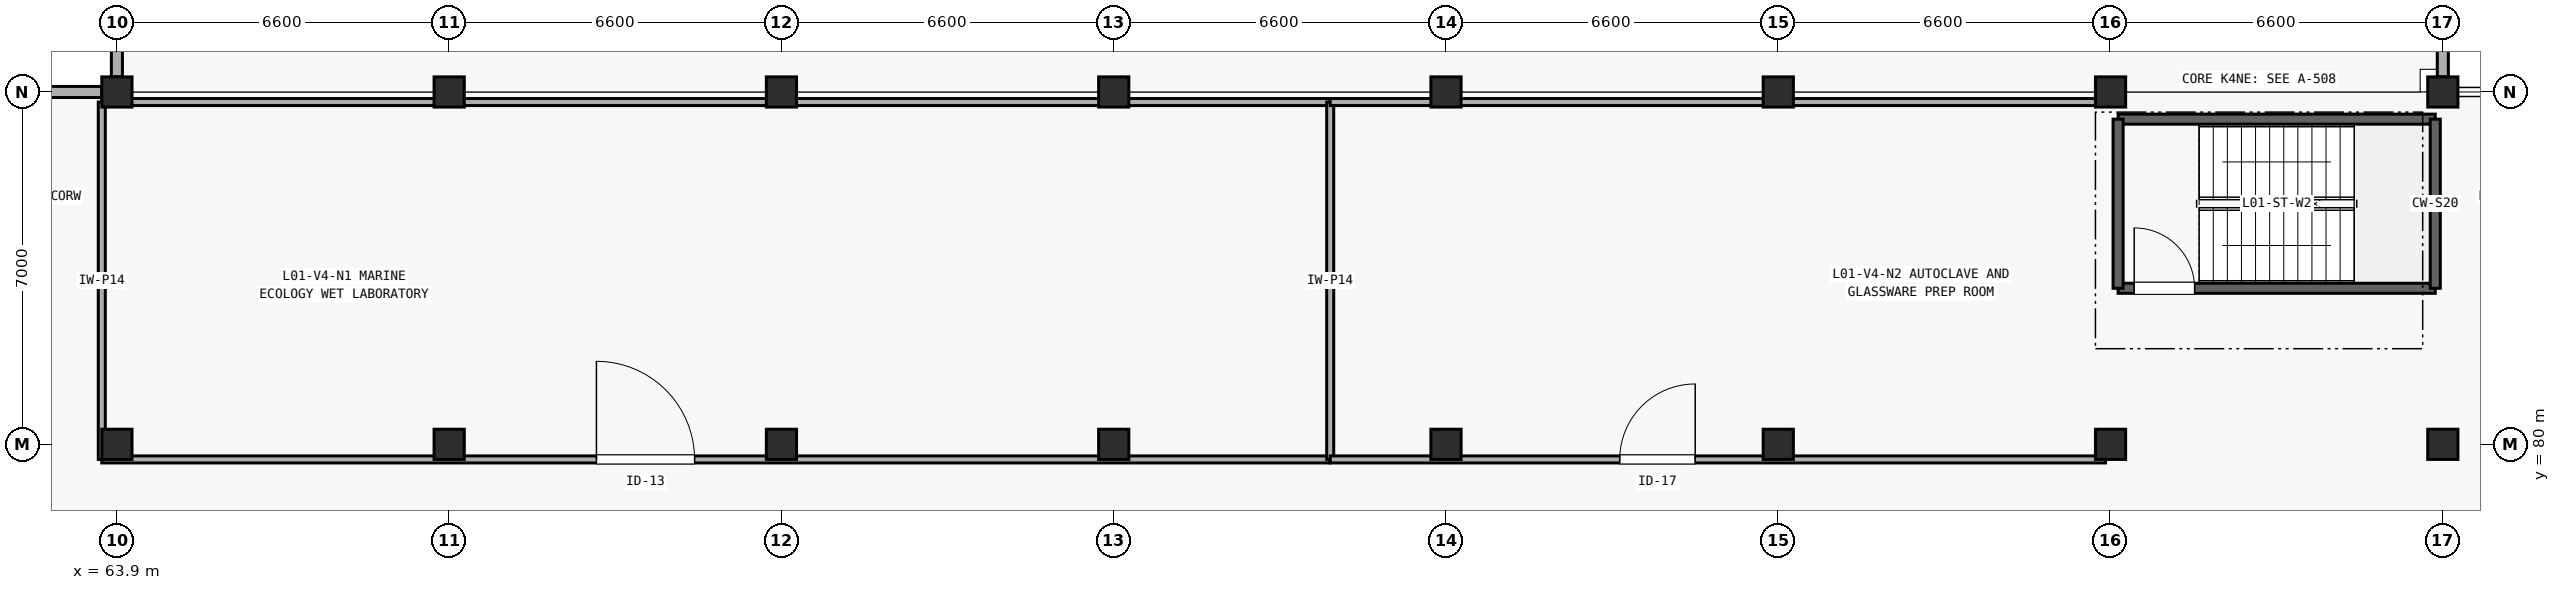
"""IFC4 building model, lengths in metres.
Left out: names, types, materials, properties, quantities, classifications, styles, units other than length and angle.
Written with IfcOpenShell. Run it as: python <this file> out.ifc"""

import sys

from ifc_helpers import new_model, si_unit, direction, frame, frame_2d, origin, origin_2d, place, context, subcontext, project, spatial, rectangle, extrude, element, fill, save


model = new_model("IFC4")
c1 = context("Model", 3, precision=1e-05, world=origin(), true_north=direction((0.0, 1.0)))
c2 = subcontext(c1, "Body", "Model", "MODEL_VIEW")
j1 = project(units=[si_unit("LENGTHUNIT", "METRE"), si_unit("PLANEANGLEUNIT", "RADIAN")], contexts=[c1])
p1 = place(None, origin())
s1 = spatial("IfcSite", under=j1, at=p1, CompositionType="ELEMENT")
p2 = place(p1, origin())
s2 = spatial("IfcBuilding", under=s1, at=p2, CompositionType="ELEMENT")
p3 = place(p2, frame((0.0, 0.0, 4.2)))
s3 = spatial("IfcBuildingStorey", under=s2, at=p3, CompositionType="ELEMENT", Elevation=4.2)
for number, where, z_axis, x_axis in (
    (1, (63.9, 80.0, 0.0), (0.0, 0.0, 1.0), (1.0, 0.0, 0.0)),
    (2, (63.9, 87.0, 0.0), (0.0, 0.0, 1.0), (1.0, 0.0, 0.0)),
    (3, (70.5, 80.0, 0.0), (0.0, 0.0, 1.0), (1.0, 0.0, 0.0)),
    (4, (70.5, 87.0, 0.0), (0.0, 0.0, 1.0), (1.0, 0.0, 0.0)),
    (5, (77.1, 80.0, 0.0), (0.0, 0.0, 1.0), (1.0, 0.0, 0.0)),
    (6, (77.1, 87.0, 0.0), (0.0, 0.0, 1.0), (1.0, 0.0, 0.0)),
    (7, (83.7, 80.0, 0.0), (0.0, 0.0, 1.0), (1.0, 0.0, 0.0)),
    (8, (83.7, 87.0, 0.0), (0.0, 0.0, 1.0), (1.0, 0.0, 0.0)),
    (9, (90.3, 80.0, 0.0), (0.0, 0.0, 1.0), (1.0, 0.0, 0.0)),
    (10, (90.3, 87.0, 0.0), (0.0, 0.0, 1.0), (1.0, 0.0, 0.0)),
    (11, (96.9, 80.0, 0.0), (0.0, 0.0, 1.0), (1.0, 0.0, 0.0)),
    (12, (96.9, 87.0, 0.0), (0.0, 0.0, 1.0), (1.0, 0.0, 0.0)),
    (13, (103.5, 80.0, 0.0), (0.0, 0.0, 1.0), (1.0, 0.0, 0.0)),
    (14, (103.5, 87.0, 0.0), (0.0, 0.0, 1.0), (1.0, 0.0, 0.0)),
    (15, (110.1, 80.0, 0.0), (0.0, 0.0, 1.0), (1.0, 0.0, 0.0)),
    (16, (110.1, 87.0, 0.0), (0.0, 0.0, 1.0), (1.0, 0.0, 0.0)),
):
    element("IfcColumn", number, at=place(p3, frame(where, z_axis=z_axis, x_axis=x_axis)), inside=s3, PredefinedType="COLUMN", context=c2, shape_type="SweptSolid", body=[
        extrude(rectangle(XDim=0.6, YDim=0.6, at=origin_2d()), origin(), (0.0, 0.0, 1.0), 4.2),
    ])
p4 = place(p3, frame((57.6, 87.0, 0.0), z_axis=(0.0, 0.0, 1.0), x_axis=(1.0, 0.0, 0.0)))
e17 = element("IfcWall", 17, at=p4, inside=s3, PredefinedType="SOLIDWALL", context=c2, shape_type="SweptSolid", body=[
    extrude(rectangle(XDim=6.0, YDim=0.22, at=frame_2d((3.0, 0.0))), origin(), (0.0, 0.0, 1.0), 3.345),
])
p5 = place(p4, frame((2.45, 0.0, 0.85)))
e18 = element("IfcOpeningElement", 18, at=p5, cuts=e17, PredefinedType="OPENING", context=c2, shape_type="SweptSolid", body=[
    extrude(rectangle(XDim=1.1, YDim=1.45, at=frame_2d((0.55, 0.725))), frame((0.0, 0.12, 0.0), z_axis=(0.0, -1.0, 0.0), x_axis=(1.0, 0.0, 0.0)), (0.0, 0.0, 1.0), 0.24),
])
p6 = place(p3, frame((63.9, 87.3, 0.0), z_axis=(0.0, 0.0, 1.0), x_axis=(0.0, 1.0, 0.0)))
e19 = element("IfcWall", 19, at=p6, inside=s3, PredefinedType="SOLIDWALL", context=c2, shape_type="SweptSolid", body=[
    extrude(rectangle(XDim=6.4, YDim=0.22, at=frame_2d((3.2, 0.0))), origin(), (0.0, 0.0, 1.0), 3.565),
])
p7 = place(p6, frame((2.175, 0.0, 0.85)))
e20 = element("IfcOpeningElement", 20, at=p7, cuts=e19, PredefinedType="OPENING", context=c2, shape_type="SweptSolid", body=[
    extrude(rectangle(XDim=2.05, YDim=1.55, at=frame_2d((1.025, 0.775))), frame((0.0, 0.12, 0.0), z_axis=(0.0, -1.0, 0.0), x_axis=(1.0, 0.0, 0.0)), (0.0, 0.0, 1.0), 0.24),
])
p8 = place(p3, frame((110.1, 87.3, 0.0), z_axis=(0.0, 0.0, 1.0), x_axis=(0.0, 1.0, 0.0)))
e21 = element("IfcWall", 21, at=p8, inside=s3, PredefinedType="SOLIDWALL", context=c2, shape_type="SweptSolid", body=[
    extrude(rectangle(XDim=6.4, YDim=0.22, at=frame_2d((3.2, 0.0))), origin(), (0.0, 0.0, 1.0), 3.505),
])
p9 = place(p8, frame((2.6, 0.0, 0.85)))
e22 = element("IfcOpeningElement", 22, at=p9, cuts=e21, PredefinedType="OPENING", context=c2, shape_type="SweptSolid", body=[
    extrude(rectangle(XDim=1.2, YDim=1.5, at=frame_2d((0.6, 0.75))), frame((0.0, 0.12, 0.0), z_axis=(0.0, -1.0, 0.0), x_axis=(1.0, 0.0, 0.0)), (0.0, 0.0, 1.0), 0.24),
])
p10 = place(p3, frame((103.65, 83.1, 0.0), z_axis=(0.0, 0.0, 1.0), x_axis=(1.0, 0.0, 0.0)))
e23 = element("IfcWall", 23, at=p10, inside=s3, PredefinedType="SHEAR", context=c2, shape_type="SweptSolid", body=[
    extrude(rectangle(XDim=6.3, YDim=0.2, at=frame_2d((3.15, 0.0))), origin(), (0.0, 0.0, 1.0), 4.2),
])
p11 = place(p10, frame((0.32, 0.0, 0.0)))
e24 = element("IfcOpeningElement", 24, at=p11, cuts=e23, PredefinedType="OPENING", context=c2, shape_type="SweptSolid", body=[
    extrude(rectangle(XDim=1.2, YDim=2.15, at=frame_2d((0.6, 1.075))), frame((0.0, 0.11, 0.0), z_axis=(0.0, -1.0, 0.0), x_axis=(1.0, 0.0, 0.0)), (0.0, 0.0, 1.0), 0.22),
])
p12 = place(p3, frame((103.65, 86.46, 0.0), z_axis=(0.0, 0.0, 1.0), x_axis=(1.0, 0.0, 0.0)))
e25 = element("IfcWall", 25, at=p12, inside=s3, PredefinedType="SHEAR", context=c2, shape_type="SweptSolid", body=[
    extrude(rectangle(XDim=6.3, YDim=0.2, at=frame_2d((3.15, 0.0))), origin(), (0.0, 0.0, 1.0), 4.2),
])
for number, where, z_axis, x_axis in (
    (26, (103.65, 83.1, 0.0), (0.0, 0.0, 1.0), (0.0, 1.0, 0.0)),
    (27, (109.95, 83.1, 0.0), (0.0, 0.0, 1.0), (0.0, 1.0, 0.0)),
):
    element("IfcWall", number, at=place(p3, frame(where, z_axis=z_axis, x_axis=x_axis)), inside=s3, PredefinedType="SHEAR", context=c2, shape_type="SweptSolid", body=[
        extrude(rectangle(XDim=3.36, YDim=0.2, at=frame_2d((1.68, 0.0))), origin(), (0.0, 0.0, 1.0), 4.2),
    ])
p13 = place(p3, frame((63.6, 79.7, 0.0), z_axis=(0.0, 0.0, 1.0), x_axis=(1.0, 0.0, 0.0)))
e28 = element("IfcWall", 28, at=p13, inside=s3, PredefinedType="PLUMBINGWALL", context=c2, shape_type="SweptSolid", body=[
    extrude(rectangle(XDim=24.4, YDim=0.14, at=frame_2d((12.2, 0.0))), origin(), (0.0, 0.0, 1.0), 3.135),
])
p14 = place(p13, frame((9.825, 0.0, 0.0)))
e29 = element("IfcOpeningElement", 29, at=p14, cuts=e28, PredefinedType="OPENING", context=c2, shape_type="SweptSolid", body=[
    extrude(rectangle(XDim=1.95, YDim=2.3, at=frame_2d((0.975, 1.15))), frame((0.0, 0.08, 0.0), z_axis=(0.0, -1.0, 0.0), x_axis=(1.0, 0.0, 0.0)), (0.0, 0.0, 1.0), 0.16),
])
p15 = place(p3, frame((63.6, 86.8, 0.0), z_axis=(0.0, 0.0, 1.0), x_axis=(1.0, 0.0, 0.0)))
e30 = element("IfcWall", 30, at=p15, inside=s3, PredefinedType="PLUMBINGWALL", context=c2, shape_type="SweptSolid", body=[
    extrude(rectangle(XDim=24.4, YDim=0.14, at=frame_2d((12.2, 0.0))), origin(), (0.0, 0.0, 1.0), 3.135),
])
p16 = place(p3, frame((63.6, 79.7, 0.0), z_axis=(0.0, 0.0, 1.0), x_axis=(0.0, 1.0, 0.0)))
e31 = element("IfcWall", 31, at=p16, inside=s3, PredefinedType="PLUMBINGWALL", context=c2, shape_type="SweptSolid", body=[
    extrude(rectangle(XDim=7.1, YDim=0.14, at=frame_2d((3.55, 0.0))), origin(), (0.0, 0.0, 1.0), 3.445),
])
p17 = place(p3, frame((88.0, 79.7, 0.0), z_axis=(0.0, 0.0, 1.0), x_axis=(0.0, 1.0, 0.0)))
e32 = element("IfcWall", 32, at=p17, inside=s3, PredefinedType="PLUMBINGWALL", context=c2, shape_type="SweptSolid", body=[
    extrude(rectangle(XDim=7.1, YDim=0.14, at=frame_2d((3.55, 0.0))), origin(), (0.0, 0.0, 1.0), 3.9),
])
p18 = place(p3, frame((88.0, 79.7, 0.0), z_axis=(0.0, 0.0, 1.0), x_axis=(1.0, 0.0, 0.0)))
e33 = element("IfcWall", 33, at=p18, inside=s3, PredefinedType="PLUMBINGWALL", context=c2, shape_type="SweptSolid", body=[
    extrude(rectangle(XDim=15.4, YDim=0.14, at=frame_2d((7.7, 0.0))), origin(), (0.0, 0.0, 1.0), 3.285),
])
p19 = place(p18, frame((5.75, 0.0, 0.0)))
e34 = element("IfcOpeningElement", 34, at=p19, cuts=e33, PredefinedType="OPENING", context=c2, shape_type="SweptSolid", body=[
    extrude(rectangle(XDim=1.5, YDim=2.15, at=frame_2d((0.75, 1.075))), frame((0.0, 0.08, 0.0), z_axis=(0.0, -1.0, 0.0), x_axis=(1.0, 0.0, 0.0)), (0.0, 0.0, 1.0), 0.16),
])
p20 = place(p3, frame((88.0, 86.8, 0.0), z_axis=(0.0, 0.0, 1.0), x_axis=(1.0, 0.0, 0.0)))
e35 = element("IfcWall", 35, at=p20, inside=s3, PredefinedType="PLUMBINGWALL", context=c2, shape_type="SweptSolid", body=[
    extrude(rectangle(XDim=15.4, YDim=0.14, at=frame_2d((7.7, 0.0))), origin(), (0.0, 0.0, 1.0), 3.285),
])
p21 = place(p11, origin())
e36 = element("IfcDoor", 36, at=p21, inside=s3, OperationType="SINGLE_SWING_LEFT", PredefinedType="DOOR", context=c2, shape_type="SweptSolid", body=[
    extrude(rectangle(XDim=1.2, YDim=2.15, at=frame_2d((0.6, 1.075))), frame((0.0, 0.025, 0.0), z_axis=(0.0, -1.0, 0.0), x_axis=(1.0, 0.0, 0.0)), (0.0, 0.0, 1.0), 0.05),
])
fill(e24, e36)
p22 = place(p14, origin())
e37 = element("IfcDoor", 37, at=p22, inside=s3, OperationType="SINGLE_SWING_LEFT", PredefinedType="DOOR", context=c2, shape_type="SweptSolid", body=[
    extrude(rectangle(XDim=1.95, YDim=2.3, at=frame_2d((0.975, 1.15))), frame((0.0, 0.025, 0.0), z_axis=(0.0, -1.0, 0.0), x_axis=(1.0, 0.0, 0.0)), (0.0, 0.0, 1.0), 0.05),
])
fill(e29, e37)
p23 = place(p19, origin())
e38 = element("IfcDoor", 38, at=p23, inside=s3, OperationType="SINGLE_SWING_RIGHT", PredefinedType="DOOR", context=c2, shape_type="SweptSolid", body=[
    extrude(rectangle(XDim=1.5, YDim=2.15, at=frame_2d((0.75, 1.075))), frame((0.0, 0.025, 0.0), z_axis=(0.0, -1.0, 0.0), x_axis=(1.0, 0.0, 0.0)), (0.0, 0.0, 1.0), 0.05),
])
fill(e34, e38)
save(model, sys.argv[1])
